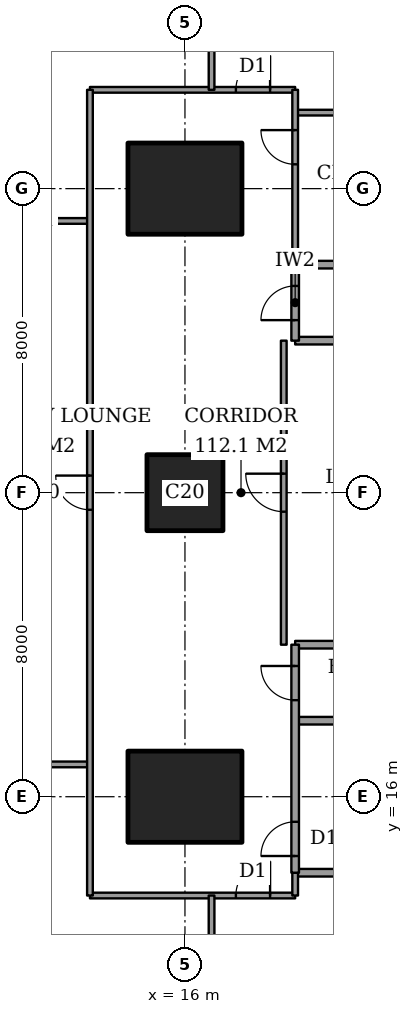
"""IFC4 building model, lengths in metres.
Left out: names, types, materials, properties, quantities, classifications, styles, units other than length and angle.
Written with IfcOpenShell. Run it as: python <this file> out.ifc"""

import sys

from ifc_helpers import new_model, si_unit, direction, frame, frame_2d, origin, origin_2d, place, context, subcontext, project, spatial, rectangle, extrude, element, fill, save


model = new_model("IFC4")
c1 = context("Model", 3, precision=1e-05, world=origin(), true_north=direction((0.0, 1.0)))
c2 = subcontext(c1, "Body", "Model", "MODEL_VIEW")
j1 = project(units=[si_unit("LENGTHUNIT", "METRE"), si_unit("PLANEANGLEUNIT", "RADIAN")], contexts=[c1])
p1 = place(None, origin())
s1 = spatial("IfcSite", under=j1, at=p1, CompositionType="ELEMENT")
p2 = place(p1, origin())
s2 = spatial("IfcBuilding", under=s1, at=p2, CompositionType="ELEMENT")
p3 = place(p2, frame((0.0, 0.0, 132.2)))
s3 = spatial("IfcBuildingStorey", under=s2, at=p3, CompositionType="ELEMENT", Elevation=132.2)
p4 = place(p3, frame((16.0, 16.0, 0.0), z_axis=(0.0, 0.0, 1.0), x_axis=(1.0, 0.0, 0.0)))
e1 = element("IfcColumn", 1, at=p4, inside=s3, PredefinedType="COLUMN", context=c2, shape_type="SweptSolid", body=[
    extrude(rectangle(XDim=3.0, YDim=2.4, at=origin_2d()), origin(), (0.0, 0.0, 1.0), 3.6),
])
p5 = place(p3, frame((16.0, 24.0, 0.0), z_axis=(0.0, 0.0, 1.0), x_axis=(1.0, 0.0, 0.0)))
e2 = element("IfcColumn", 2, at=p5, inside=s3, PredefinedType="COLUMN", context=c2, shape_type="SweptSolid", body=[
    extrude(rectangle(XDim=2.0, YDim=2.0, at=origin_2d()), origin(), (0.0, 0.0, 1.0), 3.6),
])
p6 = place(p3, frame((16.0, 32.0, 0.0), z_axis=(0.0, 0.0, 1.0), x_axis=(1.0, 0.0, 0.0)))
e3 = element("IfcColumn", 3, at=p6, inside=s3, PredefinedType="COLUMN", context=c2, shape_type="SweptSolid", body=[
    extrude(rectangle(XDim=3.0, YDim=2.4, at=origin_2d()), origin(), (0.0, 0.0, 1.0), 3.6),
])
p7 = place(p3, frame((13.5, 13.4, 0.0), z_axis=(0.0, 0.0, 1.0), x_axis=(1.0, 0.0, 0.0)))
e4 = element("IfcWall", 4, at=p7, inside=s3, PredefinedType="PARTITIONING", context=c2, shape_type="SweptSolid", body=[
    extrude(rectangle(XDim=5.4, YDim=0.15, at=frame_2d((2.7, 0.0))), origin(), (0.0, 0.0, 1.0), 3.35),
])
p8 = place(p7, frame((3.84, 0.0, 0.0)))
e5 = element("IfcOpeningElement", 5, at=p8, cuts=e4, PredefinedType="OPENING", context=c2, shape_type="SweptSolid", body=[
    extrude(rectangle(XDim=0.9, YDim=2.1, at=frame_2d((0.45, 1.05))), frame((0.0, 0.085, 0.0), z_axis=(0.0, -1.0, 0.0), x_axis=(1.0, 0.0, 0.0)), (0.0, 0.0, 1.0), 0.17),
])
p9 = place(p3, frame((18.9, 14.0, 0.0), z_axis=(0.0, 0.0, 1.0), x_axis=(1.0, 0.0, 0.0)))
e6 = element("IfcWall", 6, at=p9, inside=s3, PredefinedType="PARTITIONING", context=c2, shape_type="SweptSolid", body=[
    extrude(rectangle(XDim=5.1, YDim=0.2, at=frame_2d((2.55, 0.0))), origin(), (0.0, 0.0, 1.0), 3.35),
])
p10 = place(p3, frame((10.6, 16.85, 0.0), z_axis=(0.0, 0.0, 1.0), x_axis=(1.0, 0.0, 0.0)))
e7 = element("IfcWall", 7, at=p10, inside=s3, PredefinedType="PARTITIONING", context=c2, shape_type="SweptSolid", body=[
    extrude(rectangle(XDim=2.9, YDim=0.15, at=frame_2d((1.45, 0.0))), origin(), (0.0, 0.0, 1.0), 3.35),
])
for number, where, z_axis, x_axis in (
    (8, (18.9, 18.0, 0.0), (0.0, 0.0, 1.0), (1.0, 0.0, 0.0)),
    (9, (18.9, 20.0, 0.0), (0.0, 0.0, 1.0), (1.0, 0.0, 0.0)),
    (10, (18.9, 28.0, 0.0), (0.0, 0.0, 1.0), (1.0, 0.0, 0.0)),
    (11, (18.9, 30.0, 0.0), (0.0, 0.0, 1.0), (1.0, 0.0, 0.0)),
):
    element("IfcWall", number, at=place(p3, frame(where, z_axis=z_axis, x_axis=x_axis)), inside=s3, PredefinedType="PARTITIONING", context=c2, shape_type="SweptSolid", body=[
        extrude(rectangle(XDim=5.1, YDim=0.2, at=frame_2d((2.55, 0.0))), origin(), (0.0, 0.0, 1.0), 3.35),
    ])
p11 = place(p3, frame((10.6, 31.15, 0.0), z_axis=(0.0, 0.0, 1.0), x_axis=(1.0, 0.0, 0.0)))
e12 = element("IfcWall", 12, at=p11, inside=s3, PredefinedType="PARTITIONING", context=c2, shape_type="SweptSolid", body=[
    extrude(rectangle(XDim=2.9, YDim=0.15, at=frame_2d((1.45, 0.0))), origin(), (0.0, 0.0, 1.0), 3.35),
])
p12 = place(p3, frame((18.9, 34.0, 0.0), z_axis=(0.0, 0.0, 1.0), x_axis=(1.0, 0.0, 0.0)))
e13 = element("IfcWall", 13, at=p12, inside=s3, PredefinedType="PARTITIONING", context=c2, shape_type="SweptSolid", body=[
    extrude(rectangle(XDim=5.1, YDim=0.15, at=frame_2d((2.55, 0.0))), origin(), (0.0, 0.0, 1.0), 3.35),
])
p13 = place(p3, frame((13.5, 34.6, 0.0), z_axis=(0.0, 0.0, 1.0), x_axis=(1.0, 0.0, 0.0)))
e14 = element("IfcWall", 14, at=p13, inside=s3, PredefinedType="PARTITIONING", context=c2, shape_type="SweptSolid", body=[
    extrude(rectangle(XDim=5.4, YDim=0.15, at=frame_2d((2.7, 0.0))), origin(), (0.0, 0.0, 1.0), 3.35),
])
p14 = place(p13, frame((3.84, 0.0, 0.0)))
e15 = element("IfcOpeningElement", 15, at=p14, cuts=e14, PredefinedType="OPENING", context=c2, shape_type="SweptSolid", body=[
    extrude(rectangle(XDim=0.9, YDim=2.1, at=frame_2d((0.45, 1.05))), frame((0.0, 0.085, 0.0), z_axis=(0.0, -1.0, 0.0), x_axis=(1.0, 0.0, 0.0)), (0.0, 0.0, 1.0), 0.17),
])
p15 = place(p3, frame((13.5, 13.4, 0.0), z_axis=(0.0, 0.0, 1.0), x_axis=(0.0, 1.0, 0.0)))
e16 = element("IfcWall", 16, at=p15, inside=s3, PredefinedType="PARTITIONING", context=c2, shape_type="SweptSolid", body=[
    extrude(rectangle(XDim=21.2, YDim=0.15, at=frame_2d((10.6, 0.0))), origin(), (0.0, 0.0, 1.0), 3.35),
])
p16 = place(p15, frame((10.15, 0.0, 0.0)))
e17 = element("IfcOpeningElement", 17, at=p16, cuts=e16, PredefinedType="OPENING", context=c2, shape_type="SweptSolid", body=[
    extrude(rectangle(XDim=0.9, YDim=2.1, at=frame_2d((0.45, 1.05))), frame((0.0, 0.085, 0.0), z_axis=(0.0, -1.0, 0.0), x_axis=(1.0, 0.0, 0.0)), (0.0, 0.0, 1.0), 0.17),
])
for number, where, z_axis, x_axis in (
    (18, (16.7, 9.0, 0.0), (0.0, 0.0, 1.0), (0.0, 1.0, 0.0)),
    (19, (16.7, 34.6, 0.0), (0.0, 0.0, 1.0), (0.0, 1.0, 0.0)),
):
    element("IfcWall", number, at=place(p3, frame(where, z_axis=z_axis, x_axis=x_axis)), inside=s3, PredefinedType="PARTITIONING", context=c2, shape_type="SweptSolid", body=[
        extrude(rectangle(XDim=4.4, YDim=0.15, at=frame_2d((2.2, 0.0))), origin(), (0.0, 0.0, 1.0), 3.35),
    ])
p17 = place(p3, frame((18.6, 20.0, 0.0), z_axis=(0.0, 0.0, 1.0), x_axis=(0.0, 1.0, 0.0)))
e20 = element("IfcWall", 20, at=p17, inside=s3, PredefinedType="PARTITIONING", context=c2, shape_type="SweptSolid", body=[
    extrude(rectangle(XDim=8.0, YDim=0.15, at=frame_2d((4.0, 0.0))), origin(), (0.0, 0.0, 1.0), 3.35),
])
p18 = place(p17, frame((3.5, 0.0, 0.0)))
e21 = element("IfcOpeningElement", 21, at=p18, cuts=e20, PredefinedType="OPENING", context=c2, shape_type="SweptSolid", body=[
    extrude(rectangle(XDim=1.0, YDim=2.1, at=frame_2d((0.5, 1.05))), frame((0.0, 0.085, 0.0), z_axis=(0.0, -1.0, 0.0), x_axis=(1.0, 0.0, 0.0)), (0.0, 0.0, 1.0), 0.17),
])
p19 = place(p3, frame((18.9, 14.0, 0.0), z_axis=(0.0, 0.0, 1.0), x_axis=(0.0, 1.0, 0.0)))
e22 = element("IfcWall", 22, at=p19, inside=s3, PredefinedType="PARTITIONING", context=c2, shape_type="SweptSolid", body=[
    extrude(rectangle(XDim=6.0, YDim=0.2, at=frame_2d((3.0, 0.0))), origin(), (0.0, 0.0, 1.0), 3.35),
])
p20 = place(p19, frame((0.44, 0.0, 0.0)))
e23 = element("IfcOpeningElement", 23, at=p20, cuts=e22, PredefinedType="OPENING", context=c2, shape_type="SweptSolid", body=[
    extrude(rectangle(XDim=0.9, YDim=2.1, at=frame_2d((0.45, 1.05))), frame((0.0, 0.11, 0.0), z_axis=(0.0, -1.0, 0.0), x_axis=(1.0, 0.0, 0.0)), (0.0, 0.0, 1.0), 0.22),
])
p21 = place(p19, frame((4.54, 0.0, 0.0)))
e24 = element("IfcOpeningElement", 24, at=p21, cuts=e22, PredefinedType="OPENING", context=c2, shape_type="SweptSolid", body=[
    extrude(rectangle(XDim=0.9, YDim=2.1, at=frame_2d((0.45, 1.05))), frame((0.0, 0.11, 0.0), z_axis=(0.0, -1.0, 0.0), x_axis=(1.0, 0.0, 0.0)), (0.0, 0.0, 1.0), 0.22),
])
p22 = place(p3, frame((18.9, 28.0, 0.0), z_axis=(0.0, 0.0, 1.0), x_axis=(0.0, 1.0, 0.0)))
e25 = element("IfcWall", 25, at=p22, inside=s3, PredefinedType="PARTITIONING", context=c2, shape_type="SweptSolid", body=[
    extrude(rectangle(XDim=2.0, YDim=0.2, at=frame_2d((1.0, 0.0))), origin(), (0.0, 0.0, 1.0), 3.35),
])
p23 = place(p22, frame((0.54, 0.0, 0.0)))
e26 = element("IfcOpeningElement", 26, at=p23, cuts=e25, PredefinedType="OPENING", context=c2, shape_type="SweptSolid", body=[
    extrude(rectangle(XDim=0.9, YDim=2.1, at=frame_2d((0.45, 1.05))), frame((0.0, 0.11, 0.0), z_axis=(0.0, -1.0, 0.0), x_axis=(1.0, 0.0, 0.0)), (0.0, 0.0, 1.0), 0.22),
])
p24 = place(p3, frame((18.9, 13.4, 0.0), z_axis=(0.0, 0.0, 1.0), x_axis=(0.0, 1.0, 0.0)))
e27 = element("IfcWall", 27, at=p24, inside=s3, PredefinedType="PARTITIONING", context=c2, shape_type="SweptSolid", body=[
    extrude(rectangle(XDim=0.6, YDim=0.15, at=frame_2d((0.3, 0.0))), origin(), (0.0, 0.0, 1.0), 3.35),
])
p25 = place(p3, frame((18.9, 30.0, 0.0), z_axis=(0.0, 0.0, 1.0), x_axis=(0.0, 1.0, 0.0)))
e28 = element("IfcWall", 28, at=p25, inside=s3, PredefinedType="PARTITIONING", context=c2, shape_type="SweptSolid", body=[
    extrude(rectangle(XDim=4.6, YDim=0.15, at=frame_2d((2.3, 0.0))), origin(), (0.0, 0.0, 1.0), 3.35),
])
p26 = place(p25, frame((2.64, 0.0, 0.0)))
e29 = element("IfcOpeningElement", 29, at=p26, cuts=e28, PredefinedType="OPENING", context=c2, shape_type="SweptSolid", body=[
    extrude(rectangle(XDim=0.9, YDim=2.1, at=frame_2d((0.45, 1.05))), frame((0.0, 0.085, 0.0), z_axis=(0.0, -1.0, 0.0), x_axis=(1.0, 0.0, 0.0)), (0.0, 0.0, 1.0), 0.17),
])
p27 = place(p16, origin())
e30 = element("IfcDoor", 30, at=p27, inside=s3, OperationType="SINGLE_SWING_LEFT", PredefinedType="DOOR", context=c2, shape_type="SweptSolid", body=[
    extrude(rectangle(XDim=0.9, YDim=2.1, at=frame_2d((0.45, 1.05))), frame((0.0, 0.025, 0.0), z_axis=(0.0, -1.0, 0.0), x_axis=(1.0, 0.0, 0.0)), (0.0, 0.0, 1.0), 0.05),
])
fill(e17, e30)
p28 = place(p18, origin())
e31 = element("IfcDoor", 31, at=p28, inside=s3, OperationType="SINGLE_SWING_LEFT", PredefinedType="DOOR", context=c2, shape_type="SweptSolid", body=[
    extrude(rectangle(XDim=1.0, YDim=2.1, at=frame_2d((0.5, 1.05))), frame((0.0, 0.025, 0.0), z_axis=(0.0, -1.0, 0.0), x_axis=(1.0, 0.0, 0.0)), (0.0, 0.0, 1.0), 0.05),
])
fill(e21, e31)
p29 = place(p20, origin())
e32 = element("IfcDoor", 32, at=p29, inside=s3, OperationType="SINGLE_SWING_RIGHT", PredefinedType="DOOR", context=c2, shape_type="SweptSolid", body=[
    extrude(rectangle(XDim=0.9, YDim=2.1, at=frame_2d((0.45, 1.05))), frame((0.0, 0.025, 0.0), z_axis=(0.0, -1.0, 0.0), x_axis=(1.0, 0.0, 0.0)), (0.0, 0.0, 1.0), 0.05),
])
fill(e23, e32)
p30 = place(p21, origin())
e33 = element("IfcDoor", 33, at=p30, inside=s3, OperationType="SINGLE_SWING_LEFT", PredefinedType="DOOR", context=c2, shape_type="SweptSolid", body=[
    extrude(rectangle(XDim=0.9, YDim=2.1, at=frame_2d((0.45, 1.05))), frame((0.0, 0.025, 0.0), z_axis=(0.0, -1.0, 0.0), x_axis=(1.0, 0.0, 0.0)), (0.0, 0.0, 1.0), 0.05),
])
fill(e24, e33)
p31 = place(p23, origin())
e34 = element("IfcDoor", 34, at=p31, inside=s3, OperationType="SINGLE_SWING_RIGHT", PredefinedType="DOOR", context=c2, shape_type="SweptSolid", body=[
    extrude(rectangle(XDim=0.9, YDim=2.1, at=frame_2d((0.45, 1.05))), frame((0.0, 0.025, 0.0), z_axis=(0.0, -1.0, 0.0), x_axis=(1.0, 0.0, 0.0)), (0.0, 0.0, 1.0), 0.05),
])
fill(e26, e34)
p32 = place(p26, origin())
e35 = element("IfcDoor", 35, at=p32, inside=s3, OperationType="SINGLE_SWING_LEFT", PredefinedType="DOOR", context=c2, shape_type="SweptSolid", body=[
    extrude(rectangle(XDim=0.9, YDim=2.1, at=frame_2d((0.45, 1.05))), frame((0.0, 0.025, 0.0), z_axis=(0.0, -1.0, 0.0), x_axis=(1.0, 0.0, 0.0)), (0.0, 0.0, 1.0), 0.05),
])
fill(e29, e35)
p33 = place(p8, origin())
e36 = element("IfcDoor", 36, at=p33, inside=s3, OperationType="SINGLE_SWING_LEFT", PredefinedType="DOOR", context=c2, shape_type="SweptSolid", body=[
    extrude(rectangle(XDim=0.9, YDim=2.1, at=frame_2d((0.45, 1.05))), frame((0.0, 0.025, 0.0), z_axis=(0.0, -1.0, 0.0), x_axis=(1.0, 0.0, 0.0)), (0.0, 0.0, 1.0), 0.05),
])
fill(e5, e36)
p34 = place(p14, origin())
e37 = element("IfcDoor", 37, at=p34, inside=s3, OperationType="SINGLE_SWING_LEFT", PredefinedType="DOOR", context=c2, shape_type="SweptSolid", body=[
    extrude(rectangle(XDim=0.9, YDim=2.1, at=frame_2d((0.45, 1.05))), frame((0.0, 0.025, 0.0), z_axis=(0.0, -1.0, 0.0), x_axis=(1.0, 0.0, 0.0)), (0.0, 0.0, 1.0), 0.05),
])
fill(e15, e37)
save(model, sys.argv[1])
